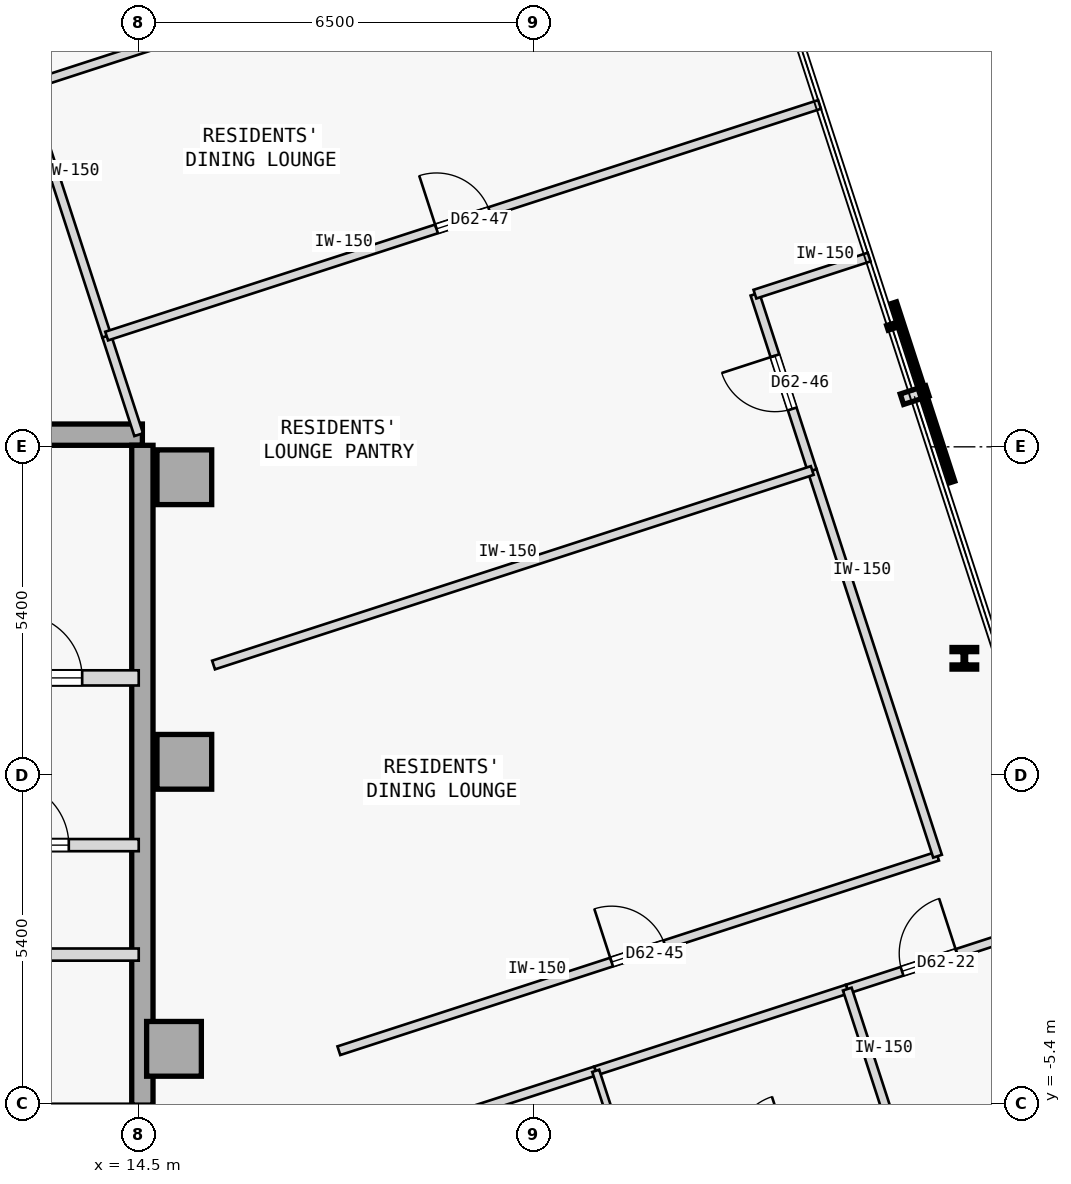
"""IFC4 building model, lengths in metres.
Left out: names, types, materials, properties, quantities, classifications, styles, units other than length and angle.
Written with IfcOpenShell. Run it as: python <this file> out.ifc"""

import sys

from ifc_helpers import new_model, si_unit, direction, frame, frame_2d, origin, origin_2d, place, context, subcontext, project, spatial, rectangle, i_section, extrude, element, fill, save


model = new_model("IFC4")
c1 = context("Model", 3, precision=1e-05, world=origin(), true_north=direction((0.0, 1.0)))
c2 = subcontext(c1, "Body", "Model", "MODEL_VIEW")
j1 = project(units=[si_unit("LENGTHUNIT", "METRE"), si_unit("PLANEANGLEUNIT", "RADIAN")], contexts=[c1])
p1 = place(None, origin())
s1 = spatial("IfcSite", under=j1, at=p1, CompositionType="ELEMENT")
p2 = place(p1, origin())
s2 = spatial("IfcBuilding", under=s1, at=p2, CompositionType="ELEMENT")
p3 = place(p2, frame((0.0, 0.0, 234.35)))
s3 = spatial("IfcBuildingStorey", under=s2, at=p3, CompositionType="ELEMENT", Elevation=234.35)
for number, where, z_axis, x_axis in (
    (1, (15.25, 4.9, 0.0), (0.0, 0.0, 1.0), (1.0, 0.0, 0.0)),
    (2, (15.25, 0.22, 0.0), (0.0, 0.0, 1.0), (1.0, 0.0, 0.0)),
    (3, (15.08, -4.5, 0.0), (0.0, 0.0, 1.0), (1.0, 0.0, 0.0)),
):
    element("IfcColumn", number, at=place(p3, frame(where, z_axis=z_axis, x_axis=x_axis)), inside=s3, PredefinedType="COLUMN", context=c2, shape_type="SweptSolid", body=[
        extrude(rectangle(XDim=0.9, YDim=0.9, at=origin_2d()), origin(), (0.0, 0.0, 1.0), 3.35),
    ])
p4 = place(p3, frame((3.15, 5.6, 0.0), z_axis=(0.0, 0.0, 1.0), x_axis=(1.0, 0.0, 0.0)))
e4 = element("IfcWall", 4, at=p4, inside=s3, PredefinedType="SHEAR", context=c2, shape_type="SweptSolid", body=[
    extrude(rectangle(XDim=11.41, YDim=0.35, at=frame_2d((5.705, 0.0))), origin(), (0.0, 0.0, 1.0), 3.125),
])
p5 = place(p3, frame((14.56, -5.425, 0.0), z_axis=(0.0, 0.0, 1.0), x_axis=(0.0, 1.0, 0.0)))
e5 = element("IfcWall", 5, at=p5, inside=s3, PredefinedType="SHEAR", context=c2, shape_type="SweptSolid", body=[
    extrude(rectangle(XDim=10.85, YDim=0.35, at=frame_2d((5.425, 0.0))), origin(), (0.0, 0.0, 1.0), 3.125),
])
p6 = place(p3, frame((28.078, 1.922, 0.0), z_axis=(0.0, 0.0, 1.0), x_axis=(1.0, 0.0, 0.0)))
e6 = element("IfcColumn", 6, at=p6, inside=s3, PredefinedType="COLUMN", context=c2, shape_type="SweptSolid", body=[
    extrude(i_section(OverallWidth=0.405, OverallDepth=0.355, WebThickness=0.042, FlangeThickness=0.068, FilletRadius=0.015, at=origin_2d()), origin(), (0.0, 0.0, 1.0), 3.35),
])
p7 = place(p3, frame((10.9, 1.6, 0.0), z_axis=(0.0, 0.0, 1.0), x_axis=(1.0, 0.0, 0.0)))
e7 = element("IfcWall", 7, at=p7, inside=s3, PredefinedType="STANDARD", context=c2, shape_type="SweptSolid", body=[
    extrude(rectangle(XDim=3.6, YDim=0.25, at=frame_2d((1.8, 0.0))), origin(), (0.0, 0.0, 1.0), 3.125),
])
p8 = place(p7, frame((1.62, 0.0, 0.0)))
e8 = element("IfcOpeningElement", 8, at=p8, cuts=e7, PredefinedType="OPENING", context=c2, shape_type="SweptSolid", body=[
    extrude(rectangle(XDim=1.05, YDim=2.15, at=frame_2d((0.525, 1.075))), frame((0.0, 0.135, 0.0), z_axis=(0.0, -1.0, 0.0), x_axis=(1.0, 0.0, 0.0)), (0.0, 0.0, 1.0), 0.27),
])
p9 = place(p3, frame((11.55, -1.15, 0.0), z_axis=(0.0, 0.0, 1.0), x_axis=(1.0, 0.0, 0.0)))
e9 = element("IfcWall", 9, at=p9, inside=s3, PredefinedType="STANDARD", context=c2, shape_type="SweptSolid", body=[
    extrude(rectangle(XDim=2.95, YDim=0.2, at=frame_2d((1.475, 0.0))), origin(), (0.0, 0.0, 1.0), 3.125),
])
p10 = place(p9, frame((0.75, 0.0, 0.0)))
e10 = element("IfcOpeningElement", 10, at=p10, cuts=e9, PredefinedType="OPENING", context=c2, shape_type="SweptSolid", body=[
    extrude(rectangle(XDim=1.05, YDim=2.18, at=frame_2d((0.525, 1.09))), frame((0.0, 0.11, 0.0), z_axis=(0.0, -1.0, 0.0), x_axis=(1.0, 0.0, 0.0)), (0.0, 0.0, 1.0), 0.22),
])
p11 = place(p3, frame((3.7, -2.95, 0.0), z_axis=(0.0, 0.0, 1.0), x_axis=(1.0, 0.0, 0.0)))
e11 = element("IfcWall", 11, at=p11, inside=s3, PredefinedType="STANDARD", context=c2, shape_type="SweptSolid", body=[
    extrude(rectangle(XDim=10.8, YDim=0.2, at=frame_2d((5.4, 0.0))), origin(), (0.0, 0.0, 1.0), 3.125),
])
p12 = place(p11, frame((0.53, 0.0, 0.0)))
e12 = element("IfcOpeningElement", 12, at=p12, cuts=e11, PredefinedType="OPENING", context=c2, shape_type="SweptSolid", body=[
    extrude(rectangle(XDim=1.1, YDim=2.15, at=frame_2d((0.55, 1.075))), frame((0.0, 0.11, 0.0), z_axis=(0.0, -1.0, 0.0), x_axis=(1.0, 0.0, 0.0)), (0.0, 0.0, 1.0), 0.22),
])
p13 = place(p11, frame((6.02, 0.0, 0.0)))
e13 = element("IfcOpeningElement", 13, at=p13, cuts=e11, PredefinedType="OPENING", context=c2, shape_type="SweptSolid", body=[
    extrude(rectangle(XDim=0.92, YDim=2.15, at=frame_2d((0.46, 1.075))), frame((0.0, 0.11, 0.0), z_axis=(0.0, -1.0, 0.0), x_axis=(1.0, 0.0, 0.0)), (0.0, 0.0, 1.0), 0.22),
])
p14 = place(p3, frame((26.152, -3.518, 0.0), z_axis=(0.0, 0.0, 1.0), x_axis=(0.951048201303, 0.309042584119, 0.0)))
e14 = element("IfcWall", 14, at=p14, inside=s3, PredefinedType="PARTITIONING", context=c2, shape_type="SweptSolid", body=[
    extrude(rectangle(XDim=4.062, YDim=0.15, at=frame_2d((2.031, 0.0))), origin(), (0.0, 0.0, 1.0), 3.125),
])
p15 = place(p14, frame((0.947, 0.0, 0.0)))
e15 = element("IfcOpeningElement", 15, at=p15, cuts=e14, PredefinedType="OPENING", context=c2, shape_type="SweptSolid", body=[
    extrude(rectangle(XDim=0.95, YDim=2.15, at=frame_2d((0.475, 1.075))), frame((0.0, 0.085, 0.0), z_axis=(0.0, -1.0, 0.0), x_axis=(1.0, 0.0, 0.0)), (0.0, 0.0, 1.0), 0.17),
])
p16 = place(p3, frame((19.78, -5.588, 0.0), z_axis=(0.0, 0.0, 1.0), x_axis=(0.951076048914, 0.308956872689, 0.0)))
e16 = element("IfcWall", 16, at=p16, inside=s3, PredefinedType="PARTITIONING", context=c2, shape_type="SweptSolid", body=[
    extrude(rectangle(XDim=2.35, YDim=0.15, at=frame_2d((1.175, 0.0))), origin(), (0.0, 0.0, 1.0), 3.125),
])
p17 = place(p3, frame((22.015, -4.862, 0.0), z_axis=(0.0, 0.0, 1.0), x_axis=(0.951052627573, 0.309028962374, 0.0)))
e17 = element("IfcWall", 17, at=p17, inside=s3, PredefinedType="PARTITIONING", context=c2, shape_type="SweptSolid", body=[
    extrude(rectangle(XDim=4.35, YDim=0.15, at=frame_2d((2.175, 0.0))), origin(), (0.0, 0.0, 1.0), 3.125),
])
p18 = place(p3, frame((17.791, -4.531, 0.0), z_axis=(0.0, 0.0, 1.0), x_axis=(0.951056769902, 0.309016213852, 0.0)))
e18 = element("IfcWall", 18, at=p18, inside=s3, PredefinedType="PARTITIONING", context=c2, shape_type="SweptSolid", body=[
    extrude(rectangle(XDim=10.352, YDim=0.15, at=frame_2d((5.176, 0.0))), origin(), (0.0, 0.0, 1.0), 3.125),
])
p19 = place(p18, frame((4.716, 0.0, 0.0)))
e19 = element("IfcOpeningElement", 19, at=p19, cuts=e18, PredefinedType="OPENING", context=c2, shape_type="SweptSolid", body=[
    extrude(rectangle(XDim=0.92, YDim=2.15, at=frame_2d((0.46, 1.075))), frame((0.0, 0.085, 0.0), z_axis=(0.0, -1.0, 0.0), x_axis=(1.0, 0.0, 0.0)), (0.0, 0.0, 1.0), 0.17),
])
p20 = place(p3, frame((27.637, -1.332, 0.0), z_axis=(0.0, 0.0, 1.0), x_axis=(-0.309047166719, 0.951046712177, 0.0)))
e20 = element("IfcWall", 20, at=p20, inside=s3, PredefinedType="PARTITIONING", context=c2, shape_type="SweptSolid", body=[
    extrude(rectangle(XDim=6.669, YDim=0.15, at=frame_2d((3.334, 0.0))), origin(), (0.0, 0.0, 1.0), 3.125),
])
p21 = place(p3, frame((25.576, 5.011, 0.0), z_axis=(0.0, 0.0, 1.0), x_axis=(-0.309011835091, 0.951058192633, 0.0)))
e21 = element("IfcWall", 21, at=p21, inside=s3, PredefinedType="PARTITIONING", context=c2, shape_type="SweptSolid", body=[
    extrude(rectangle(XDim=3.049, YDim=0.15, at=frame_2d((1.524, 0.0))), origin(), (0.0, 0.0, 1.0), 3.125),
])
p22 = place(p21, frame((1.064, 0.0, 0.0)))
e22 = element("IfcOpeningElement", 22, at=p22, cuts=e21, PredefinedType="OPENING", context=c2, shape_type="SweptSolid", body=[
    extrude(rectangle(XDim=0.92, YDim=2.15, at=frame_2d((0.46, 1.075))), frame((0.0, 0.085, 0.0), z_axis=(0.0, -1.0, 0.0), x_axis=(1.0, 0.0, 0.0)), (0.0, 0.0, 1.0), 0.17),
])
p23 = place(p3, frame((24.634, 7.91, 0.0), z_axis=(0.0, 0.0, 1.0), x_axis=(0.951054051148, 0.309024581215, 0.0)))
e23 = element("IfcWall", 23, at=p23, inside=s3, PredefinedType="PARTITIONING", context=c2, shape_type="SweptSolid", body=[
    extrude(rectangle(XDim=1.975, YDim=0.15, at=frame_2d((0.988, 0.0))), origin(), (0.0, 0.0, 1.0), 3.125),
])
p24 = place(p3, frame((26.832, -5.61, 0.0), z_axis=(0.0, 0.0, 1.0), x_axis=(-0.309060979314, 0.951042223598, 0.0)))
e24 = element("IfcWall", 24, at=p24, inside=s3, PredefinedType="PARTITIONING", context=c2, shape_type="SweptSolid", body=[
    extrude(rectangle(XDim=2.2, YDim=0.15, at=frame_2d((1.1, 0.0))), origin(), (0.0, 0.0, 1.0), 3.125),
])
p25 = place(p3, frame((22.695, -6.954, 0.0), z_axis=(0.0, 0.0, 1.0), x_axis=(-0.308960600764, 0.951074837842, 0.0)))
e25 = element("IfcWall", 25, at=p25, inside=s3, PredefinedType="PARTITIONING", context=c2, shape_type="SweptSolid", body=[
    extrude(rectangle(XDim=2.2, YDim=0.12, at=frame_2d((1.1, 0.0))), origin(), (0.0, 0.0, 1.0), 3.125),
])
p26 = place(p3, frame((14.5, 5.6, 0.0), z_axis=(0.0, 0.0, 1.0), x_axis=(-0.308872364299, 0.951103497298, 0.0)))
e26 = element("IfcWall", 26, at=p26, inside=s3, PredefinedType="PARTITIONING", context=c2, shape_type="SweptSolid", body=[
    extrude(rectangle(XDim=1.705, YDim=0.15, at=frame_2d((0.853, 0.0))), origin(), (0.0, 0.0, 1.0), 3.125),
])
p27 = place(p3, frame((13.973, 7.221, 0.0), z_axis=(0.0, 0.0, 1.0), x_axis=(-0.309038735568, 0.951049451879, 0.0)))
e27 = element("IfcWall", 27, at=p27, inside=s3, PredefinedType="PARTITIONING", context=c2, shape_type="SweptSolid", body=[
    extrude(rectangle(XDim=4.315, YDim=0.15, at=frame_2d((2.157, 0.0))), origin(), (0.0, 0.0, 1.0), 3.125),
])
p28 = place(p3, frame((15.73, 1.812, 0.0), z_axis=(0.0, 0.0, 1.0), x_axis=(0.951054517802, 0.309023145037, 0.0)))
e28 = element("IfcWall", 28, at=p28, inside=s3, PredefinedType="PARTITIONING", context=c2, shape_type="SweptSolid", body=[
    extrude(rectangle(XDim=10.352, YDim=0.15, at=frame_2d((5.176, 0.0))), origin(), (0.0, 0.0, 1.0), 3.125),
])
p29 = place(p3, frame((13.973, 7.221, 0.0), z_axis=(0.0, 0.0, 1.0), x_axis=(0.951058372493, 0.309011281527, 0.0)))
e29 = element("IfcWall", 29, at=p29, inside=s3, PredefinedType="PARTITIONING", context=c2, shape_type="SweptSolid", body=[
    extrude(rectangle(XDim=12.327, YDim=0.15, at=frame_2d((6.163, 0.0))), origin(), (0.0, 0.0, 1.0), 3.125),
])
p30 = place(p29, frame((5.704, 0.0, 0.0)))
e30 = element("IfcOpeningElement", 30, at=p30, cuts=e29, PredefinedType="OPENING", context=c2, shape_type="SweptSolid", body=[
    extrude(rectangle(XDim=0.92, YDim=2.15, at=frame_2d((0.46, 1.075))), frame((0.0, 0.085, 0.0), z_axis=(0.0, -1.0, 0.0), x_axis=(1.0, 0.0, 0.0)), (0.0, 0.0, 1.0), 0.17),
])
p31 = place(p3, frame((12.639, 11.325, 0.0), z_axis=(0.0, 0.0, 1.0), x_axis=(0.951054443032, 0.309023375149, 0.0)))
e31 = element("IfcWall", 31, at=p31, inside=s3, PredefinedType="PARTITIONING", context=c2, shape_type="SweptSolid", body=[
    extrude(rectangle(XDim=12.327, YDim=0.15, at=frame_2d((6.164, 0.0))), origin(), (0.0, 0.0, 1.0), 2.675),
])
p32 = place(p8, origin())
e32 = element("IfcDoor", 32, at=p32, inside=s3, OperationType="SINGLE_SWING_LEFT", PredefinedType="DOOR", context=c2, shape_type="SweptSolid", body=[
    extrude(rectangle(XDim=1.05, YDim=2.15, at=frame_2d((0.525, 1.075))), frame((0.0, 0.025, 0.0), z_axis=(0.0, -1.0, 0.0), x_axis=(1.0, 0.0, 0.0)), (0.0, 0.0, 1.0), 0.05),
])
fill(e8, e32)
p33 = place(p10, origin())
e33 = element("IfcDoor", 33, at=p33, inside=s3, OperationType="SINGLE_SWING_LEFT", PredefinedType="DOOR", context=c2, shape_type="SweptSolid", body=[
    extrude(rectangle(XDim=1.05, YDim=2.18, at=frame_2d((0.525, 1.09))), frame((0.0, 0.025, 0.0), z_axis=(0.0, -1.0, 0.0), x_axis=(1.0, 0.0, 0.0)), (0.0, 0.0, 1.0), 0.05),
])
fill(e10, e33)
p34 = place(p15, origin())
e34 = element("IfcDoor", 34, at=p34, inside=s3, OperationType="SINGLE_SWING_RIGHT", PredefinedType="DOOR", context=c2, shape_type="SweptSolid", body=[
    extrude(rectangle(XDim=0.95, YDim=2.15, at=frame_2d((0.475, 1.075))), frame((0.0, 0.025, 0.0), z_axis=(0.0, -1.0, 0.0), x_axis=(1.0, 0.0, 0.0)), (0.0, 0.0, 1.0), 0.05),
])
fill(e15, e34)
p35 = place(p19, origin())
e35 = element("IfcDoor", 35, at=p35, inside=s3, OperationType="SINGLE_SWING_LEFT", PredefinedType="DOOR", context=c2, shape_type="SweptSolid", body=[
    extrude(rectangle(XDim=0.92, YDim=2.15, at=frame_2d((0.46, 1.075))), frame((0.0, 0.025, 0.0), z_axis=(0.0, -1.0, 0.0), x_axis=(1.0, 0.0, 0.0)), (0.0, 0.0, 1.0), 0.05),
])
fill(e19, e35)
p36 = place(p22, origin())
e36 = element("IfcDoor", 36, at=p36, inside=s3, OperationType="SINGLE_SWING_RIGHT", PredefinedType="DOOR", context=c2, shape_type="SweptSolid", body=[
    extrude(rectangle(XDim=0.92, YDim=2.15, at=frame_2d((0.46, 1.075))), frame((0.0, 0.025, 0.0), z_axis=(0.0, -1.0, 0.0), x_axis=(1.0, 0.0, 0.0)), (0.0, 0.0, 1.0), 0.05),
])
fill(e22, e36)
p37 = place(p30, origin())
e37 = element("IfcDoor", 37, at=p37, inside=s3, OperationType="SINGLE_SWING_LEFT", PredefinedType="DOOR", context=c2, shape_type="SweptSolid", body=[
    extrude(rectangle(XDim=0.92, YDim=2.15, at=frame_2d((0.46, 1.075))), frame((0.0, 0.025, 0.0), z_axis=(0.0, -1.0, 0.0), x_axis=(1.0, 0.0, 0.0)), (0.0, 0.0, 1.0), 0.05),
])
fill(e30, e37)
save(model, sys.argv[1])
